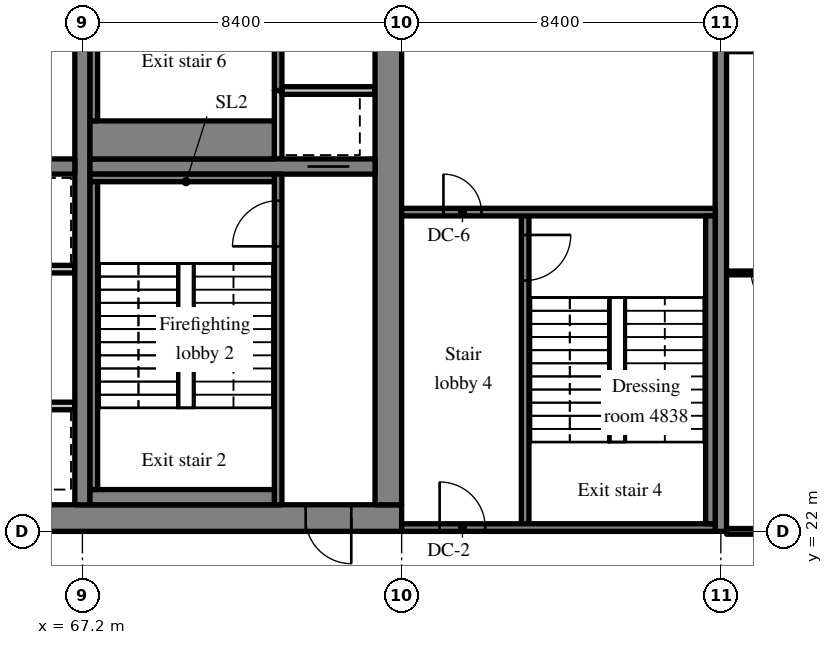
"""IFC4 building model, lengths in metres.
Left out: names, types, materials, properties, quantities, classifications, styles, units other than length and angle.
Written with IfcOpenShell. Run it as: python <this file> out.ifc"""

import sys

from ifc_helpers import new_model, si_unit, direction, frame, frame_2d, origin, place, context, subcontext, project, spatial, rectangle, extrude, source, transform, mapped, element, fill, save


model = new_model("IFC4")
c1 = context("Model", 3, precision=1e-05, world=origin(), true_north=direction((0.0, 1.0)))
c2 = subcontext(c1, "Body", "Model", "MODEL_VIEW")
j1 = project(units=[si_unit("LENGTHUNIT", "METRE"), si_unit("PLANEANGLEUNIT", "RADIAN")], contexts=[c1])
p1 = place(None, origin())
s1 = spatial("IfcSite", under=j1, at=p1, CompositionType="ELEMENT")
p2 = place(p1, origin())
s2 = spatial("IfcBuilding", under=s1, at=p2, CompositionType="ELEMENT")
p3 = place(p2, frame((0.0, 0.0, 197.2)))
s3 = spatial("IfcBuildingStorey", under=s2, at=p3, CompositionType="ELEMENT", Elevation=197.2)
m1 = source(origin(), c2, "Body", "SweptSolid", [
    extrude(rectangle(XDim=50.4, YDim=0.7, at=frame_2d((25.2, 0.0))), origin(), (0.0, 0.0, 1.0), 3.52),
])
p4 = place(p3, frame((25.2, 22.35, 0.0), z_axis=(0.0, 0.0, 1.0), x_axis=(1.0, 0.0, 0.0)))
e1 = element("IfcWall", 1, at=p4, inside=s3, PredefinedType="SHEAR", context=c2, shape_type="MappedRepresentation", body=[
    mapped(m1, transform((0.0, 0.0, 0.0), scale=1.0)),
])
m2 = source(origin(), c2, "Body", "SweptSolid", [
    extrude(rectangle(XDim=1.8, YDim=2.1, at=frame_2d((0.9, 1.05))), frame((0.0, 0.36, 0.0), z_axis=(0.0, -1.0, 0.0), x_axis=(1.0, 0.0, 0.0)), (0.0, 0.0, 1.0), 0.72),
])
p5 = place(p4, frame((15.9, 0.0, 0.0)))
e2 = element("IfcOpeningElement", 2, at=p5, cuts=e1, PredefinedType="OPENING", context=c2, shape_type="MappedRepresentation", body=[
    mapped(m2, transform((0.0, 0.0, 0.0), scale=1.0)),
])
m3 = source(origin(), c2, "Body", "SweptSolid", [
    extrude(rectangle(XDim=0.9, YDim=2.1, at=frame_2d((0.45, 1.05))), frame((0.0, 0.36, 0.0), z_axis=(0.0, -1.0, 0.0), x_axis=(1.0, 0.0, 0.0)), (0.0, 0.0, 1.0), 0.72),
])
p6 = place(p4, frame((21.5, 0.0, 0.0)))
e3 = element("IfcOpeningElement", 3, at=p6, cuts=e1, PredefinedType="OPENING", context=c2, shape_type="MappedRepresentation", body=[
    mapped(m3, transform((0.0, 0.0, 0.0), scale=1.0)),
])
p7 = place(p4, frame((32.7, 0.0, 0.0)))
e4 = element("IfcOpeningElement", 4, at=p7, cuts=e1, PredefinedType="OPENING", context=c2, shape_type="MappedRepresentation", body=[
    mapped(m2, transform((0.0, 0.0, 0.0), scale=1.0)),
])
m4 = source(origin(), c2, "Body", "SweptSolid", [
    extrude(rectangle(XDim=1.2, YDim=2.1, at=frame_2d((0.6, 1.05))), frame((0.0, 0.36, 0.0), z_axis=(0.0, -1.0, 0.0), x_axis=(1.0, 0.0, 0.0)), (0.0, 0.0, 1.0), 0.72),
])
p8 = place(p4, frame((6.475, 0.0, 0.0)))
e5 = element("IfcOpeningElement", 5, at=p8, cuts=e1, PredefinedType="OPENING", context=c2, shape_type="MappedRepresentation", body=[
    mapped(m4, transform((0.0, 0.0, 0.0), scale=1.0)),
])
p9 = place(p4, frame((47.875, 0.0, 0.0)))
e6 = element("IfcOpeningElement", 6, at=p9, cuts=e1, PredefinedType="OPENING", context=c2, shape_type="MappedRepresentation", body=[
    mapped(m4, transform((0.0, 0.0, 0.0), scale=1.0)),
])
m5 = source(origin(), c2, "Body", "SweptSolid", [
    extrude(rectangle(XDim=18.6, YDim=0.7, at=frame_2d((9.3, 0.0))), origin(), (0.0, 0.0, 1.0), 3.52),
])
p10 = place(p3, frame((75.25, 22.7, 0.0), z_axis=(0.0, 0.0, 1.0), x_axis=(0.0, 1.0, 0.0)))
e7 = element("IfcWall", 7, at=p10, inside=s3, PredefinedType="SHEAR", context=c2, shape_type="MappedRepresentation", body=[
    mapped(m5, transform((0.0, 0.0, 0.0), scale=1.0)),
])
p11 = place(p10, frame((12.7, 0.0, 0.0)))
e8 = element("IfcOpeningElement", 8, at=p11, cuts=e7, PredefinedType="OPENING", context=c2, shape_type="MappedRepresentation", body=[
    mapped(m4, transform((0.0, 0.0, 0.0), scale=1.0)),
])
m6 = source(origin(), c2, "Body", "SweptSolid", [
    extrude(rectangle(XDim=18.6, YDim=0.4, at=frame_2d((9.3, 0.0))), origin(), (0.0, 0.0, 1.0), 3.52),
])
p12 = place(p3, frame((67.2, 22.7, 0.0), z_axis=(0.0, 0.0, 1.0), x_axis=(0.0, 1.0, 0.0)))
e9 = element("IfcWall", 9, at=p12, inside=s3, PredefinedType="SHEAR", context=c2, shape_type="MappedRepresentation", body=[
    mapped(m6, transform((0.0, 0.0, 0.0), scale=1.0)),
])
m7 = source(origin(), c2, "Body", "SweptSolid", [
    extrude(rectangle(XDim=16.4, YDim=0.4, at=frame_2d((8.2, 0.0))), origin(), (0.0, 0.0, 1.0), 3.52),
])
p13 = place(p3, frame((50.6, 31.6, 0.0), z_axis=(0.0, 0.0, 1.0), x_axis=(1.0, 0.0, 0.0)))
e10 = element("IfcWall", 10, at=p13, inside=s3, PredefinedType="SHEAR", context=c2, shape_type="MappedRepresentation", body=[
    mapped(m7, transform((0.0, 0.0, 0.0), scale=1.0)),
])
m8 = source(origin(), c2, "Body", "SweptSolid", [
    extrude(rectangle(XDim=1.0, YDim=2.1, at=frame_2d((0.5, 1.05))), frame((0.0, 0.21, 0.0), z_axis=(0.0, -1.0, 0.0), x_axis=(1.0, 0.0, 0.0)), (0.0, 0.0, 1.0), 0.42),
])
p14 = place(p13, frame((0.6, 0.0, 0.0)))
e11 = element("IfcOpeningElement", 11, at=p14, cuts=e10, PredefinedType="OPENING", context=c2, shape_type="MappedRepresentation", body=[
    mapped(m8, transform((0.0, 0.0, 0.0), scale=1.0)),
])
m9 = source(origin(), c2, "Body", "SweptSolid", [
    extrude(rectangle(XDim=7.5, YDim=0.4, at=frame_2d((3.75, 0.0))), origin(), (0.0, 0.0, 1.0), 3.52),
])
p15 = place(p3, frame((67.4, 31.6, 0.0), z_axis=(0.0, 0.0, 1.0), x_axis=(1.0, 0.0, 0.0)))
e12 = element("IfcWall", 12, at=p15, inside=s3, PredefinedType="SHEAR", context=c2, shape_type="MappedRepresentation", body=[
    mapped(m9, transform((0.0, 0.0, 0.0), scale=1.0)),
])
m10 = source(origin(), c2, "Body", "SweptSolid", [
    extrude(rectangle(XDim=1.1, YDim=2.1, at=frame_2d((0.55, 1.05))), frame((0.0, 0.21, 0.0), z_axis=(0.0, -1.0, 0.0), x_axis=(1.0, 0.0, 0.0)), (0.0, 0.0, 1.0), 0.42),
])
p16 = place(p15, frame((5.725, 0.0, 0.0)))
e13 = element("IfcOpeningElement", 13, at=p16, cuts=e12, PredefinedType="OPENING", context=c2, shape_type="MappedRepresentation", body=[
    mapped(m10, transform((0.0, 0.0, 0.0), scale=1.0)),
])
m11 = source(origin(), c2, "Body", "SweptSolid", [
    extrude(rectangle(XDim=20.0, YDim=0.3, at=frame_2d((10.0, 0.0))), origin(), (0.0, 0.0, 1.0), 3.52),
])
p17 = place(p3, frame((84.0, 22.0, 0.0), z_axis=(0.0, 0.0, 1.0), x_axis=(0.0, 1.0, 0.0)))
e14 = element("IfcWall", 14, at=p17, inside=s3, PredefinedType="SHEAR", context=c2, shape_type="MappedRepresentation", body=[
    mapped(m11, transform((0.0, 0.0, 0.0), scale=1.0)),
])
m12 = source(origin(), c2, "Body", "SweptSolid", [
    extrude(rectangle(XDim=6.1, YDim=0.2, at=frame_2d((3.05, 0.0))), origin(), (0.0, 0.0, 1.0), 3.52),
])
p18 = place(p3, frame((67.0, 25.3, 0.0), z_axis=(0.0, 0.0, 1.0), x_axis=(-1.0, 0.0, 0.0)))
e15 = element("IfcWall", 15, at=p18, inside=s3, PredefinedType="SOLIDWALL", context=c2, shape_type="MappedRepresentation", body=[
    mapped(m12, transform((0.0, 0.0, 0.0), scale=1.0)),
])
m13 = source(origin(), c2, "Body", "SweptSolid", [
    extrude(rectangle(XDim=1.1, YDim=2.1, at=frame_2d((0.55, 1.05))), frame((0.0, 0.11, 0.0), z_axis=(0.0, -1.0, 0.0), x_axis=(1.0, 0.0, 0.0)), (0.0, 0.0, 1.0), 0.22),
])
p19 = place(p18, frame((1.05, 0.0, 0.0)))
e16 = element("IfcOpeningElement", 16, at=p19, cuts=e15, PredefinedType="OPENING", context=c2, shape_type="MappedRepresentation", body=[
    mapped(m13, transform((0.0, 0.0, 0.0), scale=1.0)),
])
p20 = place(p18, frame((4.05, 0.0, 0.0)))
e17 = element("IfcOpeningElement", 17, at=p20, cuts=e15, PredefinedType="OPENING", context=c2, shape_type="MappedRepresentation", body=[
    mapped(m13, transform((0.0, 0.0, 0.0), scale=1.0)),
])
m14 = source(origin(), c2, "Body", "SweptSolid", [
    extrude(rectangle(XDim=12.1, YDim=0.2, at=frame_2d((6.05, 0.0))), origin(), (0.0, 0.0, 1.0), 3.52),
])
p21 = place(p3, frame((67.0, 28.9, 0.0), z_axis=(0.0, 0.0, 1.0), x_axis=(-1.0, 0.0, 0.0)))
e18 = element("IfcWall", 18, at=p21, inside=s3, PredefinedType="SOLIDWALL", context=c2, shape_type="MappedRepresentation", body=[
    mapped(m14, transform((0.0, 0.0, 0.0), scale=1.0)),
])
p22 = place(p21, frame((1.05, 0.0, 0.0)))
e19 = element("IfcOpeningElement", 19, at=p22, cuts=e18, PredefinedType="OPENING", context=c2, shape_type="MappedRepresentation", body=[
    mapped(m13, transform((0.0, 0.0, 0.0), scale=1.0)),
])
p23 = place(p21, frame((4.05, 0.0, 0.0)))
e20 = element("IfcOpeningElement", 20, at=p23, cuts=e18, PredefinedType="OPENING", context=c2, shape_type="MappedRepresentation", body=[
    mapped(m13, transform((0.0, 0.0, 0.0), scale=1.0)),
])
m15 = source(origin(), c2, "Body", "SweptSolid", [
    extrude(rectangle(XDim=8.7, YDim=0.2, at=frame_2d((4.35, 0.0))), origin(), (0.0, 0.0, 1.0), 3.52),
])
p24 = place(p3, frame((72.35, 22.7, 0.0), z_axis=(0.0, 0.0, 1.0), x_axis=(0.0, 1.0, 0.0)))
e21 = element("IfcWall", 21, at=p24, inside=s3, PredefinedType="SOLIDWALL", context=c2, shape_type="MappedRepresentation", body=[
    mapped(m15, transform((0.0, 0.0, 0.0), scale=1.0)),
])
m16 = source(origin(), c2, "Body", "SweptSolid", [
    extrude(rectangle(XDim=1.2, YDim=2.1, at=frame_2d((0.6, 1.05))), frame((0.0, 0.11, 0.0), z_axis=(0.0, -1.0, 0.0), x_axis=(1.0, 0.0, 0.0)), (0.0, 0.0, 1.0), 0.22),
])
p25 = place(p24, frame((6.8, 0.0, 0.0)))
e22 = element("IfcOpeningElement", 22, at=p25, cuts=e21, PredefinedType="OPENING", context=c2, shape_type="MappedRepresentation", body=[
    mapped(m16, transform((0.0, 0.0, 0.0), scale=1.0)),
])
m17 = source(origin(), c2, "Body", "SweptSolid", [
    extrude(rectangle(XDim=1.8, YDim=0.2, at=frame_2d((0.9, 0.0))), origin(), (0.0, 0.0, 1.0), 3.52),
])
p26 = place(p3, frame((72.35, 31.8, 0.0), z_axis=(0.0, 0.0, 1.0), x_axis=(0.0, 1.0, 0.0)))
e23 = element("IfcWall", 23, at=p26, inside=s3, PredefinedType="SOLIDWALL", context=c2, shape_type="MappedRepresentation", body=[
    mapped(m17, transform((0.0, 0.0, 0.0), scale=1.0)),
])
m18 = source(origin(), c2, "Body", "SweptSolid", [
    extrude(rectangle(XDim=2.45, YDim=0.2, at=frame_2d((1.225, 0.0))), origin(), (0.0, 0.0, 1.0), 3.52),
])
p27 = place(p3, frame((72.45, 33.6, 0.0), z_axis=(0.0, 0.0, 1.0), x_axis=(1.0, 0.0, 0.0)))
e24 = element("IfcWall", 24, at=p27, inside=s3, PredefinedType="SOLIDWALL", context=c2, shape_type="MappedRepresentation", body=[
    mapped(m18, transform((0.0, 0.0, 0.0), scale=1.0)),
])
m19 = source(origin(), c2, "Body", "SweptSolid", [
    extrude(rectangle(XDim=7.7, YDim=0.2, at=frame_2d((3.85, 0.0))), origin(), (0.0, 0.0, 1.0), 3.52),
])
p28 = place(p3, frame((72.35, 33.6, 0.0), z_axis=(0.0, 0.0, 1.0), x_axis=(0.0, 1.0, 0.0)))
e25 = element("IfcWall", 25, at=p28, inside=s3, PredefinedType="SOLIDWALL", context=c2, shape_type="MappedRepresentation", body=[
    mapped(m19, transform((0.0, 0.0, 0.0), scale=1.0)),
])
m20 = source(origin(), c2, "Body", "SweptSolid", [
    extrude(rectangle(XDim=1.8, YDim=2.1, at=frame_2d((0.9, 1.05))), frame((0.0, 0.11, 0.0), z_axis=(0.0, -1.0, 0.0), x_axis=(1.0, 0.0, 0.0)), (0.0, 0.0, 1.0), 0.22),
])
p29 = place(p28, frame((5.3, 0.0, 0.0)))
e26 = element("IfcOpeningElement", 26, at=p29, cuts=e25, PredefinedType="OPENING", context=c2, shape_type="MappedRepresentation", body=[
    mapped(m20, transform((0.0, 0.0, 0.0), scale=1.0)),
])
m21 = source(origin(), c2, "Body", "SweptSolid", [
    extrude(rectangle(XDim=8.3, YDim=0.2, at=frame_2d((4.15, 0.0))), origin(), (0.0, 0.0, 1.0), 3.52),
])
p30 = place(p3, frame((78.85, 22.1, 0.0), z_axis=(0.0, 0.0, 1.0), x_axis=(0.0, 1.0, 0.0)))
e27 = element("IfcWall", 27, at=p30, inside=s3, PredefinedType="SOLIDWALL", context=c2, shape_type="MappedRepresentation", body=[
    mapped(m21, transform((0.0, 0.0, 0.0), scale=1.0)),
])
p31 = place(p30, frame((6.5, 0.0, 0.0)))
e28 = element("IfcOpeningElement", 28, at=p31, cuts=e27, PredefinedType="OPENING", context=c2, shape_type="MappedRepresentation", body=[
    mapped(m16, transform((0.0, 0.0, 0.0), scale=1.0)),
])
m22 = source(origin(), c2, "Body", "SweptSolid", [
    extrude(rectangle(XDim=8.25, YDim=0.2, at=frame_2d((4.125, 0.0))), origin(), (0.0, 0.0, 1.0), 3.52),
])
p32 = place(p3, frame((83.85, 22.1, 0.0), z_axis=(0.0, 0.0, 1.0), x_axis=(-1.0, 0.0, 0.0)))
e29 = element("IfcWall", 29, at=p32, inside=s3, PredefinedType="SOLIDWALL", context=c2, shape_type="MappedRepresentation", body=[
    mapped(m22, transform((0.0, 0.0, 0.0), scale=1.0)),
])
p33 = place(p32, frame((6.05, 0.0, 0.0)))
e30 = element("IfcOpeningElement", 30, at=p33, cuts=e29, PredefinedType="OPENING", context=c2, shape_type="MappedRepresentation", body=[
    mapped(m16, transform((0.0, 0.0, 0.0), scale=1.0)),
])
p34 = place(p3, frame((83.85, 30.4, 0.0), z_axis=(0.0, 0.0, 1.0), x_axis=(-1.0, 0.0, 0.0)))
e31 = element("IfcWall", 31, at=p34, inside=s3, PredefinedType="SOLIDWALL", context=c2, shape_type="MappedRepresentation", body=[
    mapped(m22, transform((0.0, 0.0, 0.0), scale=1.0)),
])
m23 = source(origin(), c2, "Body", "SweptSolid", [
    extrude(rectangle(XDim=1.0, YDim=2.1, at=frame_2d((0.5, 1.05))), frame((0.0, 0.11, 0.0), z_axis=(0.0, -1.0, 0.0), x_axis=(1.0, 0.0, 0.0)), (0.0, 0.0, 1.0), 0.22),
])
p35 = place(p34, frame((6.15, 0.0, 0.0)))
e32 = element("IfcOpeningElement", 32, at=p35, cuts=e31, PredefinedType="OPENING", context=c2, shape_type="MappedRepresentation", body=[
    mapped(m23, transform((0.0, 0.0, 0.0), scale=1.0)),
])
m24 = source(origin(), c2, "Body", "SweptSolid", [
    extrude(rectangle(XDim=4.85, YDim=0.4, at=frame_2d((2.425, 0.0))), origin(), (0.0, 0.0, 1.0), 3.52),
])
p36 = place(p3, frame((67.4, 22.9, 0.0), z_axis=(0.0, 0.0, 1.0), x_axis=(1.0, 0.0, 0.0)))
e33 = element("IfcWall", 33, at=p36, inside=s3, PredefinedType="SOLIDWALL", context=c2, shape_type="MappedRepresentation", body=[
    mapped(m24, transform((0.0, 0.0, 0.0), scale=1.0)),
])
m25 = source(origin(), c2, "Body", "SweptSolid", [
    extrude(rectangle(XDim=4.85, YDim=0.2, at=frame_2d((2.425, 0.0))), origin(), (0.0, 0.0, 1.0), 3.52),
])
p37 = place(p3, frame((67.4, 31.3, 0.0), z_axis=(0.0, 0.0, 1.0), x_axis=(1.0, 0.0, 0.0)))
e34 = element("IfcWall", 34, at=p37, inside=s3, PredefinedType="SOLIDWALL", context=c2, shape_type="MappedRepresentation", body=[
    mapped(m25, transform((0.0, 0.0, 0.0), scale=1.0)),
])
m26 = source(origin(), c2, "Body", "SweptSolid", [
    extrude(rectangle(XDim=8.1, YDim=0.2, at=frame_2d((4.05, 0.0))), origin(), (0.0, 0.0, 1.0), 3.52),
])
p38 = place(p3, frame((67.5, 23.1, 0.0), z_axis=(0.0, 0.0, 1.0), x_axis=(0.0, 1.0, 0.0)))
e35 = element("IfcWall", 35, at=p38, inside=s3, PredefinedType="SOLIDWALL", context=c2, shape_type="MappedRepresentation", body=[
    mapped(m26, transform((0.0, 0.0, 0.0), scale=1.0)),
])
m27 = source(origin(), c2, "Body", "SweptSolid", [
    extrude(rectangle(XDim=4.85, YDim=1.0, at=frame_2d((2.425, 0.0))), origin(), (0.0, 0.0, 1.0), 3.52),
])
p39 = place(p3, frame((67.4, 32.3, 0.0), z_axis=(0.0, 0.0, 1.0), x_axis=(1.0, 0.0, 0.0)))
e36 = element("IfcWall", 36, at=p39, inside=s3, PredefinedType="SOLIDWALL", context=c2, shape_type="MappedRepresentation", body=[
    mapped(m27, transform((0.0, 0.0, 0.0), scale=1.0)),
])
p40 = place(p3, frame((67.5, 32.8, 0.0), z_axis=(0.0, 0.0, 1.0), x_axis=(0.0, 1.0, 0.0)))
e37 = element("IfcWall", 37, at=p40, inside=s3, PredefinedType="SOLIDWALL", context=c2, shape_type="MappedRepresentation", body=[
    mapped(m26, transform((0.0, 0.0, 0.0), scale=1.0)),
])
m28 = source(origin(), c2, "Body", "SweptSolid", [
    extrude(rectangle(XDim=8.1, YDim=0.25, at=frame_2d((4.05, 0.0))), origin(), (0.0, 0.0, 1.0), 3.52),
])
p41 = place(p3, frame((83.725, 22.2, 0.0), z_axis=(0.0, 0.0, 1.0), x_axis=(0.0, 1.0, 0.0)))
e38 = element("IfcWall", 38, at=p41, inside=s3, PredefinedType="SOLIDWALL", context=c2, shape_type="MappedRepresentation", body=[
    mapped(m28, transform((0.0, 0.0, 0.0), scale=1.0)),
])
m29 = source(origin(), c2, "Body", "SweptSolid", [
    extrude(rectangle(XDim=2.2, YDim=0.1, at=frame_2d((1.1, 0.0))), origin(), (0.0, 0.0, 1.0), 3.52),
])
p42 = place(p3, frame((84.15, 28.8, 0.0), z_axis=(0.0, 0.0, 1.0), x_axis=(1.0, 0.0, 0.0)))
e39 = element("IfcWall", 39, at=p42, inside=s3, PredefinedType="PARTITIONING", context=c2, shape_type="MappedRepresentation", body=[
    mapped(m29, transform((0.0, 0.0, 0.0), scale=1.0)),
])
m30 = source(origin(), c2, "Body", "SweptSolid", [
    extrude(rectangle(XDim=0.9, YDim=2.1, at=frame_2d((0.45, 1.05))), frame((0.0, 0.06, 0.0), z_axis=(0.0, -1.0, 0.0), x_axis=(1.0, 0.0, 0.0)), (0.0, 0.0, 1.0), 0.12),
])
p43 = place(p42, frame((0.65, 0.0, 0.0)))
e40 = element("IfcOpeningElement", 40, at=p43, cuts=e39, PredefinedType="OPENING", context=c2, shape_type="MappedRepresentation", body=[
    mapped(m30, transform((0.0, 0.0, 0.0), scale=1.0)),
])
m31 = source(origin(), c2, "Body", "SweptSolid", [
    extrude(rectangle(XDim=7.95, YDim=0.15, at=frame_2d((3.975, 0.0))), origin(), (0.0, 0.0, 1.0), 2.82),
])
p44 = place(p3, frame((84.15, 22.0, 0.0), z_axis=(0.0, 0.0, 1.0), x_axis=(1.0, 0.0, 0.0)))
e41 = element("IfcWall", 41, at=p44, inside=s3, PredefinedType="PARTITIONING", context=c2, shape_type="MappedRepresentation", body=[
    mapped(m31, transform((0.0, 0.0, 0.0), scale=1.0)),
])
m32 = source(origin(), c2, "Body", "SweptSolid", [
    extrude(rectangle(XDim=1.0, YDim=2.1, at=frame_2d((0.5, 1.05))), frame((0.0, 0.085, 0.0), z_axis=(0.0, -1.0, 0.0), x_axis=(1.0, 0.0, 0.0)), (0.0, 0.0, 1.0), 0.17),
])
p45 = place(p44, frame((6.4, 0.0, 0.0)))
e42 = element("IfcOpeningElement", 42, at=p45, cuts=e41, PredefinedType="OPENING", context=c2, shape_type="MappedRepresentation", body=[
    mapped(m32, transform((0.0, 0.0, 0.0), scale=1.0)),
])
m33 = source(origin(), c2, "Body", "SweptSolid", [
    extrude(rectangle(XDim=1.2, YDim=2.1, at=frame_2d((0.6, 1.05))), frame((0.0, 0.025, 0.0), z_axis=(0.0, -1.0, 0.0), x_axis=(1.0, 0.0, 0.0)), (0.0, 0.0, 1.0), 0.05),
])
p46 = place(p25, origin())
e43 = element("IfcDoor", 43, at=p46, inside=s3, OperationType="SINGLE_SWING_LEFT", PredefinedType="DOOR", context=c2, shape_type="MappedRepresentation", body=[
    mapped(m33, transform((0.0, 0.0, 0.0), scale=1.0)),
])
fill(e22, e43)
m34 = source(origin(), c2, "Body", "SweptSolid", [
    extrude(rectangle(XDim=1.2, YDim=2.1, at=frame_2d((0.6, 1.05))), frame((0.0, 0.275, 0.0), z_axis=(0.0, -1.0, 0.0), x_axis=(1.0, 0.0, 0.0)), (0.0, 0.0, 1.0), 0.05),
])
p47 = place(p9, origin())
e44 = element("IfcDoor", 44, at=p47, inside=s3, OperationType="SINGLE_SWING_RIGHT", PredefinedType="DOOR", context=c2, shape_type="MappedRepresentation", body=[
    mapped(m34, transform((0.0, 0.0, 0.0), scale=1.0)),
])
fill(e6, e44)
m35 = source(origin(), c2, "Body", "SweptSolid", [
    extrude(rectangle(XDim=1.1, YDim=2.1, at=frame_2d((0.55, 1.05))), frame((0.0, 0.025, 0.0), z_axis=(0.0, -1.0, 0.0), x_axis=(1.0, 0.0, 0.0)), (0.0, 0.0, 1.0), 0.05),
])
p48 = place(p16, origin())
e45 = element("IfcDoor", 45, at=p48, inside=s3, OperationType="SLIDING_TO_RIGHT", PredefinedType="DOOR", context=c2, shape_type="MappedRepresentation", body=[
    mapped(m35, transform((0.0, 0.0, 0.0), scale=1.0)),
])
fill(e13, e45)
p49 = place(p31, origin())
e46 = element("IfcDoor", 46, at=p49, inside=s3, OperationType="SINGLE_SWING_RIGHT", PredefinedType="DOOR", context=c2, shape_type="MappedRepresentation", body=[
    mapped(m33, transform((0.0, 0.0, 0.0), scale=1.0)),
])
fill(e28, e46)
p50 = place(p33, origin())
e47 = element("IfcDoor", 47, at=p50, inside=s3, OperationType="SINGLE_SWING_RIGHT", PredefinedType="DOOR", context=c2, shape_type="MappedRepresentation", body=[
    mapped(m33, transform((0.0, 0.0, 0.0), scale=1.0)),
])
fill(e30, e47)
m36 = source(origin(), c2, "Body", "SweptSolid", [
    extrude(rectangle(XDim=1.0, YDim=2.1, at=frame_2d((0.5, 1.05))), frame((0.0, 0.025, 0.0), z_axis=(0.0, -1.0, 0.0), x_axis=(1.0, 0.0, 0.0)), (0.0, 0.0, 1.0), 0.05),
])
p51 = place(p35, origin())
e48 = element("IfcDoor", 48, at=p51, inside=s3, OperationType="SINGLE_SWING_RIGHT", PredefinedType="DOOR", context=c2, shape_type="MappedRepresentation", body=[
    mapped(m36, transform((0.0, 0.0, 0.0), scale=1.0)),
])
fill(e32, e48)
m37 = source(origin(), c2, "Body", "SweptSolid", [
    extrude(rectangle(XDim=0.9, YDim=2.1, at=frame_2d((0.45, 1.05))), frame((0.0, 0.025, 0.0), z_axis=(0.0, -1.0, 0.0), x_axis=(1.0, 0.0, 0.0)), (0.0, 0.0, 1.0), 0.05),
])
p52 = place(p43, origin())
e49 = element("IfcDoor", 49, at=p52, inside=s3, OperationType="SINGLE_SWING_RIGHT", PredefinedType="DOOR", context=c2, shape_type="MappedRepresentation", body=[
    mapped(m37, transform((0.0, 0.0, 0.0), scale=1.0)),
])
fill(e40, e49)
save(model, sys.argv[1])
